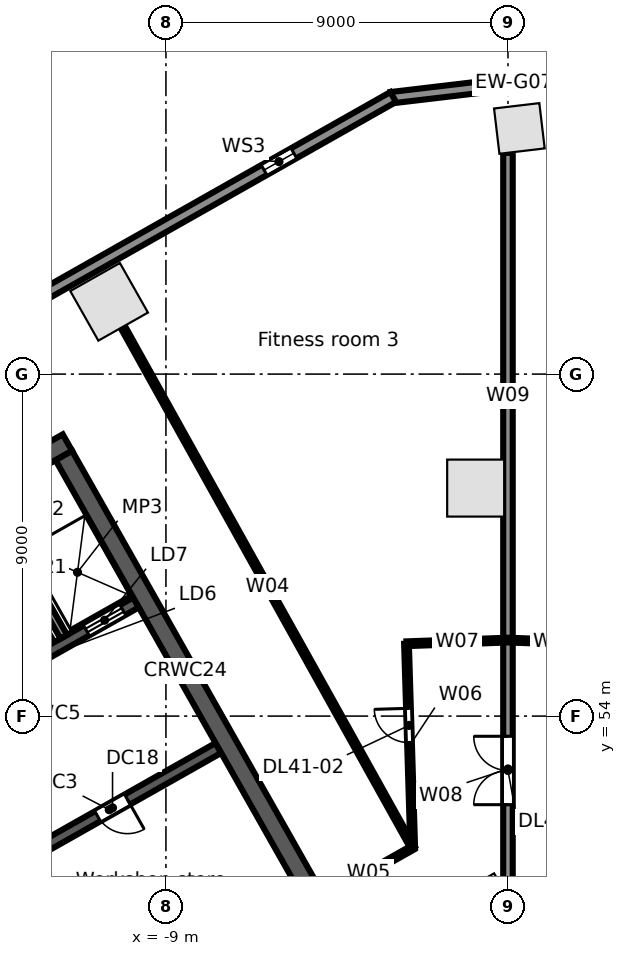
"""IFC4 building model, lengths in metres.
Left out: names, types, materials, properties, quantities, classifications, styles, units other than length and angle.
Written with IfcOpenShell. Run it as: python <this file> out.ifc"""

import sys

from ifc_helpers import new_model, si_unit, direction, frame, frame_2d, origin, origin_2d, place, context, subcontext, project, spatial, rectangle, extrude, element, fill, save


model = new_model("IFC4")
c1 = context("Model", 3, precision=1e-05, world=origin(), true_north=direction((0.0, 1.0)))
c2 = subcontext(c1, "Body", "Model", "MODEL_VIEW")
j1 = project(units=[si_unit("LENGTHUNIT", "METRE"), si_unit("PLANEANGLEUNIT", "RADIAN")], contexts=[c1])
p1 = place(None, origin())
s1 = spatial("IfcSite", under=j1, at=p1, CompositionType="ELEMENT")
p2 = place(p1, origin())
s2 = spatial("IfcBuilding", under=s1, at=p2, CompositionType="ELEMENT")
p3 = place(p2, frame((0.0, 0.0, 198.9)))
s3 = spatial("IfcBuildingStorey", under=s2, at=p3, CompositionType="ELEMENT", Elevation=198.9)
p4 = place(p3, frame((0.3, 69.464, 0.0), z_axis=(0.0, 0.0, 1.0), x_axis=(-0.993068456955, -0.117537397458, 0.0)))
e1 = element("IfcColumn", 1, at=p4, inside=s3, PredefinedType="COLUMN", context=c2, shape_type="SweptSolid", body=[
    extrude(rectangle(XDim=1.2, YDim=1.2, at=origin_2d()), origin(), (0.0, 0.0, 1.0), 4.0),
])
p5 = place(p3, frame((-10.495, 64.902, 0.0), z_axis=(0.0, 0.0, 1.0), x_axis=(-0.87035569594, -0.492423560103, 0.0)))
e2 = element("IfcColumn", 2, at=p5, inside=s3, PredefinedType="COLUMN", context=c2, shape_type="SweptSolid", body=[
    extrude(rectangle(XDim=1.5, YDim=1.5, at=origin_2d()), origin(), (0.0, 0.0, 1.0), 4.0),
])
p6 = place(p3, frame((-0.591, 49.044, 0.0), z_axis=(0.0, 0.0, 1.0), x_axis=(0.87035569594, 0.492423560103, 0.0)))
e3 = element("IfcColumn", 3, at=p6, inside=s3, PredefinedType="COLUMN", context=c2, shape_type="SweptSolid", body=[
    extrude(rectangle(XDim=1.2, YDim=1.2, at=origin_2d()), origin(), (0.0, 0.0, 1.0), 4.0),
])
p7 = place(p3, frame((-0.85, 60.0, 0.0), z_axis=(0.0, 0.0, 1.0), x_axis=(0.0, 1.0, 0.0)))
e4 = element("IfcColumn", 4, at=p7, inside=s3, PredefinedType="COLUMN", context=c2, shape_type="SweptSolid", body=[
    extrude(rectangle(XDim=1.5, YDim=1.5, at=origin_2d()), origin(), (0.0, 0.0, 1.0), 4.0),
])
p8 = place(p3, frame((-3.076, 70.273, 0.0), z_axis=(0.0, 0.0, 1.0), x_axis=(0.993067743007, 0.117543429416, 0.0)))
e5 = element("IfcWall", 5, at=p8, inside=s3, PredefinedType="STANDARD", context=c2, shape_type="SweptSolid", body=[
    extrude(rectangle(XDim=6.516, YDim=0.3, at=frame_2d((3.258, 0.0))), origin(), (0.0, 0.0, 1.0), 3.65),
])
p9 = place(p3, frame((-58.745, 38.764, 0.0), z_axis=(0.0, 0.0, 1.0), x_axis=(0.870355811726, 0.492423355453, 0.0)))
e6 = element("IfcWall", 6, at=p9, inside=s3, PredefinedType="STANDARD", context=c2, shape_type="SweptSolid", body=[
    extrude(rectangle(XDim=64.025, YDim=0.3, at=frame_2d((32.013, 0.0))), origin(), (0.0, 0.0, 1.0), 3.65),
])
p10 = place(p9, frame((60.122, 0.0, 0.6)))
e7 = element("IfcOpeningElement", 7, at=p10, cuts=e6, PredefinedType="OPENING", context=c2, shape_type="SweptSolid", body=[
    extrude(rectangle(XDim=0.9, YDim=2.4, at=frame_2d((0.45, 1.2))), frame((0.0, 0.16, 0.0), z_axis=(0.0, -1.0, 0.0), x_axis=(1.0, 0.0, 0.0)), (0.0, 0.0, 1.0), 0.32),
])
p11 = place(p9, frame((50.992, 0.0, 0.6)))
e8 = element("IfcOpeningElement", 8, at=p11, cuts=e6, PredefinedType="OPENING", context=c2, shape_type="SweptSolid", body=[
    extrude(rectangle(XDim=0.9, YDim=2.4, at=frame_2d((0.45, 1.2))), frame((0.0, 0.16, 0.0), z_axis=(0.0, -1.0, 0.0), x_axis=(1.0, 0.0, 0.0)), (0.0, 0.0, 1.0), 0.32),
])
p12 = place(p9, frame((41.862, 0.0, 0.6)))
e9 = element("IfcOpeningElement", 9, at=p12, cuts=e6, PredefinedType="OPENING", context=c2, shape_type="SweptSolid", body=[
    extrude(rectangle(XDim=0.9, YDim=2.4, at=frame_2d((0.45, 1.2))), frame((0.0, 0.16, 0.0), z_axis=(0.0, -1.0, 0.0), x_axis=(1.0, 0.0, 0.0)), (0.0, 0.0, 1.0), 0.32),
])
p13 = place(p9, frame((32.732, 0.0, 0.6)))
e10 = element("IfcOpeningElement", 10, at=p13, cuts=e6, PredefinedType="OPENING", context=c2, shape_type="SweptSolid", body=[
    extrude(rectangle(XDim=0.9, YDim=2.4, at=frame_2d((0.45, 1.2))), frame((0.0, 0.16, 0.0), z_axis=(0.0, -1.0, 0.0), x_axis=(1.0, 0.0, 0.0)), (0.0, 0.0, 1.0), 0.32),
])
p14 = place(p9, frame((23.602, 0.0, 0.6)))
e11 = element("IfcOpeningElement", 11, at=p14, cuts=e6, PredefinedType="OPENING", context=c2, shape_type="SweptSolid", body=[
    extrude(rectangle(XDim=0.9, YDim=2.4, at=frame_2d((0.45, 1.2))), frame((0.0, 0.16, 0.0), z_axis=(0.0, -1.0, 0.0), x_axis=(1.0, 0.0, 0.0)), (0.0, 0.0, 1.0), 0.32),
])
p15 = place(p9, frame((14.472, 0.0, 0.6)))
e12 = element("IfcOpeningElement", 12, at=p15, cuts=e6, PredefinedType="OPENING", context=c2, shape_type="SweptSolid", body=[
    extrude(rectangle(XDim=0.9, YDim=2.4, at=frame_2d((0.45, 1.2))), frame((0.0, 0.16, 0.0), z_axis=(0.0, -1.0, 0.0), x_axis=(1.0, 0.0, 0.0)), (0.0, 0.0, 1.0), 0.32),
])
p16 = place(p9, frame((5.342, 0.0, 0.6)))
e13 = element("IfcOpeningElement", 13, at=p16, cuts=e6, PredefinedType="OPENING", context=c2, shape_type="SweptSolid", body=[
    extrude(rectangle(XDim=0.9, YDim=2.4, at=frame_2d((0.45, 1.2))), frame((0.0, 0.16, 0.0), z_axis=(0.0, -1.0, 0.0), x_axis=(1.0, 0.0, 0.0)), (0.0, 0.0, 1.0), 0.32),
])
p17 = place(p3, frame((-13.365, 49.911, 0.0), z_axis=(0.0, 0.0, 1.0), x_axis=(0.870356769198, 0.492421663121, 0.0)))
e14 = element("IfcWall", 14, at=p17, inside=s3, PredefinedType="SOLIDWALL", context=c2, shape_type="SweptSolid", body=[
    extrude(rectangle(XDim=6.6, YDim=0.3, at=frame_2d((3.3, 0.0))), origin(), (0.0, 0.0, 1.0), 3.65),
])
p18 = place(p17, frame((2.95, 0.0, 0.0)))
e15 = element("IfcOpeningElement", 15, at=p18, cuts=e14, PredefinedType="OPENING", context=c2, shape_type="SweptSolid", body=[
    extrude(rectangle(XDim=0.9, YDim=2.1, at=frame_2d((0.45, 1.05))), frame((0.0, 0.16, 0.0), z_axis=(0.0, -1.0, 0.0), x_axis=(1.0, 0.0, 0.0)), (0.0, 0.0, 1.0), 0.32),
])
p19 = place(p3, frame((-15.618, 53.691, 0.0), z_axis=(0.0, 0.0, 1.0), x_axis=(0.870363236066, 0.492410232738, 0.0)))
e16 = element("IfcWall", 16, at=p19, inside=s3, PredefinedType="SOLIDWALL", context=c2, shape_type="SweptSolid", body=[
    extrude(rectangle(XDim=6.7, YDim=0.3, at=frame_2d((3.35, 0.0))), origin(), (0.0, 0.0, 1.0), 3.65),
])
p20 = place(p19, frame((0.6, 0.0, 0.0)))
e17 = element("IfcOpeningElement", 17, at=p20, cuts=e16, PredefinedType="OPENING", context=c2, shape_type="SweptSolid", body=[
    extrude(rectangle(XDim=1.1, YDim=2.1, at=frame_2d((0.55, 1.05))), frame((0.0, 0.16, 0.0), z_axis=(0.0, -1.0, 0.0), x_axis=(1.0, 0.0, 0.0)), (0.0, 0.0, 1.0), 0.32),
])
p21 = place(p19, frame((2.9, 0.0, 0.0)))
e18 = element("IfcOpeningElement", 18, at=p21, cuts=e16, PredefinedType="OPENING", context=c2, shape_type="SweptSolid", body=[
    extrude(rectangle(XDim=1.1, YDim=2.1, at=frame_2d((0.55, 1.05))), frame((0.0, 0.16, 0.0), z_axis=(0.0, -1.0, 0.0), x_axis=(1.0, 0.0, 0.0)), (0.0, 0.0, 1.0), 0.32),
])
p22 = place(p19, frame((5.2, 0.0, 0.0)))
e19 = element("IfcOpeningElement", 19, at=p22, cuts=e16, PredefinedType="OPENING", context=c2, shape_type="SweptSolid", body=[
    extrude(rectangle(XDim=1.1, YDim=2.1, at=frame_2d((0.55, 1.05))), frame((0.0, 0.16, 0.0), z_axis=(0.0, -1.0, 0.0), x_axis=(1.0, 0.0, 0.0)), (0.0, 0.0, 1.0), 0.32),
])
p23 = place(p3, frame((-24.647, 53.811, 0.0), z_axis=(0.0, 0.0, 1.0), x_axis=(0.87034965173, 0.492434243055, 0.0)))
e20 = element("IfcWall", 20, at=p23, inside=s3, PredefinedType="SOLIDWALL", context=c2, shape_type="SweptSolid", body=[
    extrude(rectangle(XDim=15.0, YDim=0.5, at=frame_2d((7.5, 0.0))), origin(), (0.0, 0.0, 1.0), 3.65),
])
p24 = place(p3, frame((-13.291, 49.781, 0.0), z_axis=(0.0, 0.0, 1.0), x_axis=(0.492396453737, -0.870371031427, 0.0)))
e21 = element("IfcWall", 21, at=p24, inside=s3, PredefinedType="SOLIDWALL", context=c2, shape_type="SweptSolid", body=[
    extrude(rectangle(XDim=4.15, YDim=0.3, at=frame_2d((2.075, 0.0))), origin(), (0.0, 0.0, 1.0), 3.65),
])
p25 = place(p3, frame((-13.732, 59.699, 0.0), z_axis=(0.0, 0.0, 1.0), x_axis=(0.492396453737, -0.870371031427, 0.0)))
e22 = element("IfcWall", 22, at=p25, inside=s3, PredefinedType="SOLIDWALL", context=c2, shape_type="SweptSolid", body=[
    extrude(rectangle(XDim=4.15, YDim=0.2, at=frame_2d((2.075, 0.0))), origin(), (0.0, 0.0, 1.0), 3.65),
])
p26 = place(p3, frame((-11.687, 60.856, 0.0), z_axis=(0.0, 0.0, 1.0), x_axis=(0.492427267353, -0.870353598469, 0.0)))
e23 = element("IfcWall", 23, at=p26, inside=s3, PredefinedType="SOLIDWALL", context=c2, shape_type="SweptSolid", body=[
    extrude(rectangle(XDim=13.0, YDim=0.5, at=frame_2d((6.5, 0.0))), origin(), (0.0, 0.0, 1.0), 3.65),
])
p27 = place(p3, frame((-10.137, 64.243, 0.0), z_axis=(0.0, 0.0, 1.0), x_axis=(0.486452862603, -0.873706822948, 0.0)))
e24 = element("IfcWall", 24, at=p27, inside=s3, PredefinedType="PARTITIONING", context=c2, shape_type="SweptSolid", body=[
    extrude(rectangle(XDim=15.685, YDim=0.125, at=frame_2d((7.842, 0.0))), origin(), (0.0, 0.0, 1.0), 2.822),
])
p28 = place(p3, frame((-4.821, 49.23, 0.0), z_axis=(0.0, 0.0, 1.0), x_axis=(0.870371217631, 0.492396124598, 0.0)))
e25 = element("IfcWall", 25, at=p28, inside=s3, PredefinedType="PARTITIONING", context=c2, shape_type="SweptSolid", body=[
    extrude(rectangle(XDim=2.659, YDim=0.125, at=frame_2d((1.329, 0.0))), origin(), (0.0, 0.0, 1.0), 3.65),
])
p29 = place(p3, frame((-2.67, 55.904, 0.0), z_axis=(0.0, 0.0, 1.0), x_axis=(0.030338701418, -0.999539675649, 0.0)))
e26 = element("IfcWall", 26, at=p29, inside=s3, PredefinedType="PARTITIONING", context=c2, shape_type="SweptSolid", body=[
    extrude(rectangle(XDim=5.367, YDim=0.125, at=frame_2d((2.684, 0.0))), origin(), (0.0, 0.0, 1.0), 2.822),
])
p30 = place(p29, frame((1.7, 0.0, 0.0)))
e27 = element("IfcOpeningElement", 27, at=p30, cuts=e26, PredefinedType="OPENING", context=c2, shape_type="SweptSolid", body=[
    extrude(rectangle(XDim=0.9, YDim=2.1, at=frame_2d((0.45, 1.05))), frame((0.0, 0.073, 0.0), z_axis=(0.0, -1.0, 0.0), x_axis=(1.0, 0.0, 0.0)), (0.0, 0.0, 1.0), 0.145),
])
p31 = place(p3, frame((-2.67, 55.904, 0.0), z_axis=(0.0, 0.0, 1.0), x_axis=(0.999354913865, 0.03591317494, 0.0)))
e28 = element("IfcWall", 28, at=p31, inside=s3, PredefinedType="PARTITIONING", context=c2, shape_type="SweptSolid", body=[
    extrude(rectangle(XDim=2.672, YDim=0.125, at=frame_2d((1.336, 0.0))), origin(), (0.0, 0.0, 1.0), 3.65),
])
p32 = place(p3, frame((0.0, 49.219, 0.0), z_axis=(0.0, 0.0, 1.0), x_axis=(0.0, 1.0, 0.0)))
e29 = element("IfcWall", 29, at=p32, inside=s3, PredefinedType="PARTITIONING", context=c2, shape_type="SweptSolid", body=[
    extrude(rectangle(XDim=6.781, YDim=0.25, at=frame_2d((3.391, 0.0))), origin(), (0.0, 0.0, 1.0), 2.83),
])
p33 = place(p32, frame((2.45, 0.0, 0.0)))
e30 = element("IfcOpeningElement", 30, at=p33, cuts=e29, PredefinedType="OPENING", context=c2, shape_type="SweptSolid", body=[
    extrude(rectangle(XDim=1.8, YDim=2.1, at=frame_2d((0.9, 1.05))), frame((0.0, 0.135, 0.0), z_axis=(0.0, -1.0, 0.0), x_axis=(1.0, 0.0, 0.0)), (0.0, 0.0, 1.0), 0.27),
])
p34 = place(p3, frame((0.0, 56.0, 0.0), z_axis=(0.0, 0.0, 1.0), x_axis=(0.0, 1.0, 0.0)))
e31 = element("IfcWall", 31, at=p34, inside=s3, PredefinedType="PARTITIONING", context=c2, shape_type="SweptSolid", body=[
    extrude(rectangle(XDim=12.824, YDim=0.25, at=frame_2d((6.412, 0.0))), origin(), (0.0, 0.0, 1.0), 2.718),
])
p35 = place(p3, frame((0.0, 56.0, 0.0), z_axis=(0.0, 0.0, 1.0), x_axis=(0.999349313684, -0.036068673934, 0.0)))
e32 = element("IfcWall", 32, at=p35, inside=s3, PredefinedType="PARTITIONING", context=c2, shape_type="SweptSolid", body=[
    extrude(rectangle(XDim=2.471, YDim=0.125, at=frame_2d((1.235, 0.0))), origin(), (0.0, 0.0, 1.0), 3.65),
])
p36 = place(p10, origin())
e33 = element("IfcWindow", 33, at=p36, inside=s3, PartitioningType="SINGLE_PANEL", PredefinedType="WINDOW", context=c2, shape_type="SweptSolid", body=[
    extrude(rectangle(XDim=0.9, YDim=2.4, at=frame_2d((0.45, 1.2))), frame((0.0, 0.03, 0.0), z_axis=(0.0, -1.0, 0.0), x_axis=(1.0, 0.0, 0.0)), (0.0, 0.0, 1.0), 0.06),
])
fill(e7, e33)
p37 = place(p22, origin())
e34 = element("IfcDoor", 34, at=p37, inside=s3, OperationType="DOUBLE_DOOR_SLIDING", PredefinedType="DOOR", context=c2, shape_type="SweptSolid", body=[
    extrude(rectangle(XDim=1.1, YDim=2.1, at=frame_2d((0.55, 1.05))), frame((0.0, 0.025, 0.0), z_axis=(0.0, -1.0, 0.0), x_axis=(1.0, 0.0, 0.0)), (0.0, 0.0, 1.0), 0.05),
])
fill(e19, e34)
p38 = place(p18, frame((0.9, 0.0, 0.0), z_axis=(0.0, 0.0, 1.0), x_axis=(-1.0, 0.0, 0.0)))
e35 = element("IfcDoor", 35, at=p38, inside=s3, OperationType="SINGLE_SWING_LEFT", PredefinedType="DOOR", context=c2, shape_type="SweptSolid", body=[
    extrude(rectangle(XDim=0.9, YDim=2.1, at=frame_2d((0.45, 1.05))), frame((0.0, 0.025, 0.0), z_axis=(0.0, -1.0, 0.0), x_axis=(1.0, 0.0, 0.0)), (0.0, 0.0, 1.0), 0.05),
])
fill(e15, e35)
p39 = place(p30, frame((0.9, 0.0, 0.0), z_axis=(0.0, 0.0, 1.0), x_axis=(-1.0, 0.0, 0.0)))
e36 = element("IfcDoor", 36, at=p39, inside=s3, OperationType="SINGLE_SWING_RIGHT", PredefinedType="DOOR", context=c2, shape_type="SweptSolid", body=[
    extrude(rectangle(XDim=0.9, YDim=2.1, at=frame_2d((0.45, 1.05))), frame((0.0, 0.025, 0.0), z_axis=(0.0, -1.0, 0.0), x_axis=(1.0, 0.0, 0.0)), (0.0, 0.0, 1.0), 0.05),
])
fill(e27, e36)
p40 = place(p33, origin())
e37 = element("IfcDoor", 37, at=p40, inside=s3, OperationType="DOUBLE_DOOR_SINGLE_SWING", PredefinedType="DOOR", context=c2, shape_type="SweptSolid", body=[
    extrude(rectangle(XDim=1.8, YDim=2.1, at=frame_2d((0.9, 1.05))), frame((0.0, 0.025, 0.0), z_axis=(0.0, -1.0, 0.0), x_axis=(1.0, 0.0, 0.0)), (0.0, 0.0, 1.0), 0.05),
])
fill(e30, e37)
save(model, sys.argv[1])
